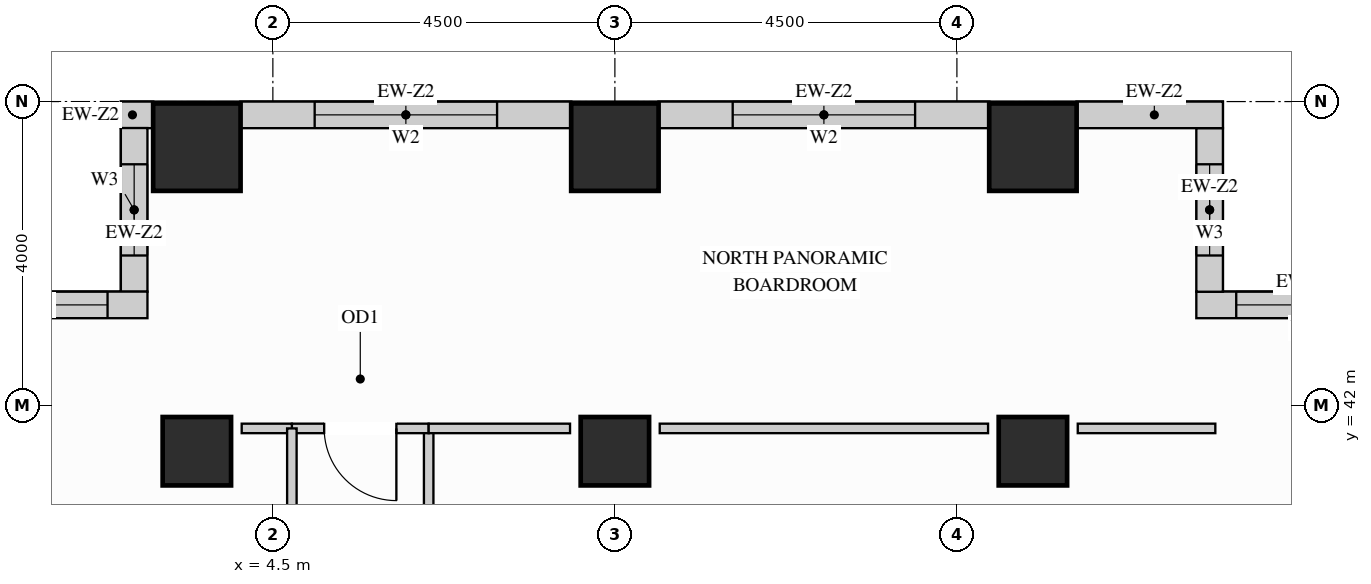
"""IFC4 building model, lengths in metres.
Left out: names, types, materials, properties, quantities, classifications, styles, units other than length and angle.
Written with IfcOpenShell. Run it as: python <this file> out.ifc"""

import sys

from ifc_helpers import new_model, si_unit, direction, frame, frame_2d, origin, origin_2d, place, context, subcontext, project, spatial, rectangle, extrude, source, transform, mapped, element, fill, save


model = new_model("IFC4")
c1 = context("Model", 3, precision=1e-05, world=origin(), true_north=direction((0.0, 1.0)))
c2 = subcontext(c1, "Body", "Model", "MODEL_VIEW")
j1 = project(units=[si_unit("LENGTHUNIT", "METRE"), si_unit("PLANEANGLEUNIT", "RADIAN")], contexts=[c1])
p1 = place(None, origin())
s1 = spatial("IfcSite", under=j1, at=p1, CompositionType="ELEMENT")
p2 = place(p1, origin())
s2 = spatial("IfcBuilding", under=s1, at=p2, CompositionType="ELEMENT")
p3 = place(p2, frame((0.0, 0.0, 95.4)))
s3 = spatial("IfcBuildingStorey", under=s2, at=p3, CompositionType="ELEMENT", Elevation=95.4)
m1 = source(origin(), c2, "Body", "SweptSolid", [
    extrude(rectangle(XDim=0.9, YDim=0.9, at=origin_2d()), origin(), (0.0, 0.0, 1.0), 3.38),
])
for number, where, z_axis, x_axis in (
    (1, (14.5, 41.4, 0.0), (0.0, 0.0, 1.0), (1.0, 0.0, 0.0)),
    (2, (3.5, 41.4, 0.0), (0.0, 0.0, 1.0), (1.0, 0.0, 0.0)),
    (3, (9.0, 41.4, 0.0), (0.0, 0.0, 1.0), (1.0, 0.0, 0.0)),
):
    element("IfcColumn", number, at=place(p3, frame(where, z_axis=z_axis, x_axis=x_axis)), inside=s3, PredefinedType="COLUMN", context=c2, shape_type="MappedRepresentation", body=[
        mapped(m1, transform((0.0, 0.0, 0.0), x_axis=(1.0, 0.0, 0.0), y_axis=(0.0, 1.0, 0.0), z_axis=(0.0, 0.0, 1.0))),
    ])
m2 = source(origin(), c2, "Body", "SweptSolid", [
    extrude(rectangle(XDim=1.15, YDim=1.15, at=origin_2d()), origin(), (0.0, 0.0, 1.0), 3.38),
])
for number, where, z_axis, x_axis in (
    (4, (14.5, 45.4, 0.0), (0.0, 0.0, 1.0), (1.0, 0.0, 0.0)),
    (5, (3.5, 45.4, 0.0), (0.0, 0.0, 1.0), (1.0, 0.0, 0.0)),
    (6, (9.0, 45.4, 0.0), (0.0, 0.0, 1.0), (1.0, 0.0, 0.0)),
):
    element("IfcColumn", number, at=place(p3, frame(where, z_axis=z_axis, x_axis=x_axis)), inside=s3, PredefinedType="COLUMN", context=c2, shape_type="MappedRepresentation", body=[
        mapped(m2, transform((0.0, 0.0, 0.0), x_axis=(1.0, 0.0, 0.0), y_axis=(0.0, 1.0, 0.0), z_axis=(0.0, 0.0, 1.0))),
    ])
p4 = place(p3, frame((19.5, 43.325, 0.0), z_axis=(0.0, 0.0, 1.0), x_axis=(-1.0, 0.0, 0.0)))
e7 = element("IfcWall", 7, at=p4, inside=s3, PredefinedType="SOLIDWALL", context=c2, shape_type="SweptSolid", body=[
    extrude(rectangle(XDim=2.85, YDim=0.35, at=frame_2d((1.425, 0.0))), origin(), (0.0, 0.0, 1.0), 3.365),
])
p5 = place(p4, frame((0.525, 0.0, 0.78)))
e8 = element("IfcOpeningElement", 8, at=p5, cuts=e7, PredefinedType="OPENING", context=c2, shape_type="SweptSolid", body=[
    extrude(rectangle(XDim=1.8, YDim=2.1, at=frame_2d((0.9, 1.05))), frame((0.0, 0.185, 0.0), z_axis=(0.0, -1.0, 0.0), x_axis=(1.0, 0.0, 0.0)), (0.0, 0.0, 1.0), 0.37),
])
p6 = place(p3, frame((16.825, 43.498, 0.0), z_axis=(0.0, 0.0, 1.0), x_axis=(0.0, 1.0, 0.0)))
e9 = element("IfcWall", 9, at=p6, inside=s3, PredefinedType="SOLIDWALL", context=c2, shape_type="SweptSolid", body=[
    extrude(rectangle(XDim=2.154, YDim=0.35, at=frame_2d((1.077, 0.0))), origin(), (0.0, 0.0, 1.0), 3.365),
])
p7 = place(p6, frame((0.477, 0.0, 0.78)))
e10 = element("IfcOpeningElement", 10, at=p7, cuts=e9, PredefinedType="OPENING", context=c2, shape_type="SweptSolid", body=[
    extrude(rectangle(XDim=1.2, YDim=2.1, at=frame_2d((0.6, 1.05))), frame((0.0, 0.185, 0.0), z_axis=(0.0, -1.0, 0.0), x_axis=(1.0, 0.0, 0.0)), (0.0, 0.0, 1.0), 0.37),
])
m3 = source(origin(), c2, "Body", "SweptSolid", [
    extrude(rectangle(XDim=1.927, YDim=0.35, at=frame_2d((0.963, 0.0))), origin(), (0.0, 0.0, 1.0), 3.365),
])
p8 = place(p3, frame((17.0, 45.825, 0.0), z_axis=(0.0, 0.0, 1.0), x_axis=(-1.0, 0.0, 0.0)))
e11 = element("IfcWall", 11, at=p8, inside=s3, PredefinedType="SOLIDWALL", context=c2, shape_type="MappedRepresentation", body=[
    mapped(m3, transform((0.0, 0.0, 0.0), x_axis=(1.0, 0.0, 0.0), y_axis=(0.0, 1.0, 0.0), z_axis=(0.0, 0.0, 1.0))),
])
p9 = place(p3, frame((13.927, 45.825, 0.0), z_axis=(0.0, 0.0, 1.0), x_axis=(-1.0, 0.0, 0.0)))
e12 = element("IfcWall", 12, at=p9, inside=s3, PredefinedType="SOLIDWALL", context=c2, shape_type="SweptSolid", body=[
    extrude(rectangle(XDim=4.354, YDim=0.35, at=frame_2d((2.177, 0.0))), origin(), (0.0, 0.0, 1.0), 3.365),
])
p10 = place(p9, frame((0.977, 0.0, 0.78)))
e13 = element("IfcOpeningElement", 13, at=p10, cuts=e12, PredefinedType="OPENING", context=c2, shape_type="SweptSolid", body=[
    extrude(rectangle(XDim=2.4, YDim=2.1, at=frame_2d((1.2, 1.05))), frame((0.0, 0.185, 0.0), z_axis=(0.0, -1.0, 0.0), x_axis=(1.0, 0.0, 0.0)), (0.0, 0.0, 1.0), 0.37),
])
p11 = place(p3, frame((8.427, 45.825, 0.0), z_axis=(0.0, 0.0, 1.0), x_axis=(-1.0, 0.0, 0.0)))
e14 = element("IfcWall", 14, at=p11, inside=s3, PredefinedType="SOLIDWALL", context=c2, shape_type="SweptSolid", body=[
    extrude(rectangle(XDim=4.354, YDim=0.35, at=frame_2d((2.177, 0.0))), origin(), (0.0, 0.0, 1.0), 3.365),
])
p12 = place(p11, frame((0.977, 0.0, 0.78)))
e15 = element("IfcOpeningElement", 15, at=p12, cuts=e14, PredefinedType="OPENING", context=c2, shape_type="SweptSolid", body=[
    extrude(rectangle(XDim=2.4, YDim=2.1, at=frame_2d((1.2, 1.05))), frame((0.0, 0.185, 0.0), z_axis=(0.0, -1.0, 0.0), x_axis=(1.0, 0.0, 0.0)), (0.0, 0.0, 1.0), 0.37),
])
m4 = source(origin(), c2, "Body", "SweptSolid", [
    extrude(rectangle(XDim=0.427, YDim=0.35, at=frame_2d((0.213, 0.0))), origin(), (0.0, 0.0, 1.0), 3.365),
])
p13 = place(p3, frame((2.927, 45.825, 0.0), z_axis=(0.0, 0.0, 1.0), x_axis=(-1.0, 0.0, 0.0)))
e16 = element("IfcWall", 16, at=p13, inside=s3, PredefinedType="SOLIDWALL", context=c2, shape_type="MappedRepresentation", body=[
    mapped(m4, transform((0.0, 0.0, 0.0), x_axis=(1.0, 0.0, 0.0), y_axis=(0.0, 1.0, 0.0), z_axis=(0.0, 0.0, 1.0))),
])
p14 = place(p3, frame((2.675, 45.652, 0.0), z_axis=(0.0, 0.0, 1.0), x_axis=(0.0, -1.0, 0.0)))
e17 = element("IfcWall", 17, at=p14, inside=s3, PredefinedType="SOLIDWALL", context=c2, shape_type="SweptSolid", body=[
    extrude(rectangle(XDim=2.154, YDim=0.35, at=frame_2d((1.077, 0.0))), origin(), (0.0, 0.0, 1.0), 3.365),
])
p15 = place(p14, frame((0.477, 0.0, 0.78)))
e18 = element("IfcOpeningElement", 18, at=p15, cuts=e17, PredefinedType="OPENING", context=c2, shape_type="SweptSolid", body=[
    extrude(rectangle(XDim=1.2, YDim=2.1, at=frame_2d((0.6, 1.05))), frame((0.0, 0.185, 0.0), z_axis=(0.0, -1.0, 0.0), x_axis=(1.0, 0.0, 0.0)), (0.0, 0.0, 1.0), 0.37),
])
p16 = place(p3, frame((2.85, 43.325, 0.0), z_axis=(0.0, 0.0, 1.0), x_axis=(-1.0, 0.0, 0.0)))
e19 = element("IfcWall", 19, at=p16, inside=s3, PredefinedType="SOLIDWALL", context=c2, shape_type="SweptSolid", body=[
    extrude(rectangle(XDim=2.85, YDim=0.35, at=frame_2d((1.425, 0.0))), origin(), (0.0, 0.0, 1.0), 3.365),
])
p17 = place(p16, frame((0.525, 0.0, 0.78)))
e20 = element("IfcOpeningElement", 20, at=p17, cuts=e19, PredefinedType="OPENING", context=c2, shape_type="SweptSolid", body=[
    extrude(rectangle(XDim=1.8, YDim=2.1, at=frame_2d((0.9, 1.05))), frame((0.0, 0.185, 0.0), z_axis=(0.0, -1.0, 0.0), x_axis=(1.0, 0.0, 0.0)), (0.0, 0.0, 1.0), 0.37),
])
p18 = place(p3, frame((6.55, 37.077, 0.0), z_axis=(0.0, 0.0, 1.0), x_axis=(0.0, 1.0, 0.0)))
e21 = element("IfcWall", 21, at=p18, inside=s3, PredefinedType="PARTITIONING", context=c2, shape_type="SweptSolid", body=[
    extrude(rectangle(XDim=4.623, YDim=0.125, at=frame_2d((2.312, 0.0))), origin(), (0.0, 0.0, 1.0), 3.365),
])
p19 = place(p18, frame((1.836, 0.0, 0.0)))
e22 = element("IfcOpeningElement", 22, at=p19, cuts=e21, PredefinedType="OPENING", context=c2, shape_type="SweptSolid", body=[
    extrude(rectangle(XDim=0.95, YDim=2.15, at=frame_2d((0.475, 1.075))), frame((0.0, 0.073, 0.0), z_axis=(0.0, -1.0, 0.0), x_axis=(1.0, 0.0, 0.0)), (0.0, 0.0, 1.0), 0.145),
])
p20 = place(p3, frame((4.75, 41.7, 0.0), z_axis=(0.0, 0.0, 1.0), x_axis=(1.0, 0.0, 0.0)))
e23 = element("IfcWall", 23, at=p20, inside=s3, PredefinedType="PARTITIONING", context=c2, shape_type="SweptSolid", body=[
    extrude(rectangle(XDim=1.8, YDim=0.125, at=frame_2d((0.9, 0.0))), origin(), (0.0, 0.0, 1.0), 3.365),
])
p21 = place(p20, frame((0.425, 0.0, 0.0)))
e24 = element("IfcOpeningElement", 24, at=p21, cuts=e23, PredefinedType="OPENING", context=c2, shape_type="SweptSolid", body=[
    extrude(rectangle(XDim=0.95, YDim=2.15, at=frame_2d((0.475, 1.075))), frame((0.0, 0.073, 0.0), z_axis=(0.0, -1.0, 0.0), x_axis=(1.0, 0.0, 0.0)), (0.0, 0.0, 1.0), 0.145),
])
m5 = source(origin(), c2, "Body", "SweptSolid", [
    extrude(rectangle(XDim=1.86, YDim=0.125, at=frame_2d((0.93, 0.0))), origin(), (0.0, 0.0, 1.0), 3.365),
])
p22 = place(p3, frame((6.55, 41.7, 0.0), z_axis=(0.0, 0.0, 1.0), x_axis=(1.0, 0.0, 0.0)))
e25 = element("IfcWall", 25, at=p22, inside=s3, PredefinedType="PARTITIONING", context=c2, shape_type="MappedRepresentation", body=[
    mapped(m5, transform((0.0, 0.0, 0.0), x_axis=(1.0, 0.0, 0.0), y_axis=(0.0, 1.0, 0.0), z_axis=(0.0, 0.0, 1.0))),
])
m6 = source(origin(), c2, "Body", "SweptSolid", [
    extrude(rectangle(XDim=4.32, YDim=0.125, at=frame_2d((2.16, 0.0))), origin(), (0.0, 0.0, 1.0), 3.365),
])
p23 = place(p3, frame((9.59, 41.7, 0.0), z_axis=(0.0, 0.0, 1.0), x_axis=(1.0, 0.0, 0.0)))
e26 = element("IfcWall", 26, at=p23, inside=s3, PredefinedType="PARTITIONING", context=c2, shape_type="MappedRepresentation", body=[
    mapped(m6, transform((0.0, 0.0, 0.0), x_axis=(1.0, 0.0, 0.0), y_axis=(0.0, 1.0, 0.0), z_axis=(0.0, 0.0, 1.0))),
])
m7 = source(origin(), c2, "Body", "SweptSolid", [
    extrude(rectangle(XDim=1.81, YDim=0.125, at=frame_2d((0.905, 0.0))), origin(), (0.0, 0.0, 1.0), 3.365),
])
p24 = place(p3, frame((15.09, 41.7, 0.0), z_axis=(0.0, 0.0, 1.0), x_axis=(1.0, 0.0, 0.0)))
e27 = element("IfcWall", 27, at=p24, inside=s3, PredefinedType="PARTITIONING", context=c2, shape_type="MappedRepresentation", body=[
    mapped(m7, transform((0.0, 0.0, 0.0), x_axis=(1.0, 0.0, 0.0), y_axis=(0.0, 1.0, 0.0), z_axis=(0.0, 0.0, 1.0))),
])
m8 = source(origin(), c2, "Body", "SweptSolid", [
    extrude(rectangle(XDim=0.66, YDim=0.125, at=frame_2d((0.33, 0.0))), origin(), (0.0, 0.0, 1.0), 3.365),
])
p25 = place(p3, frame((4.09, 41.7, 0.0), z_axis=(0.0, 0.0, 1.0), x_axis=(1.0, 0.0, 0.0)))
e28 = element("IfcWall", 28, at=p25, inside=s3, PredefinedType="PARTITIONING", context=c2, shape_type="MappedRepresentation", body=[
    mapped(m8, transform((0.0, 0.0, 0.0), x_axis=(1.0, 0.0, 0.0), y_axis=(0.0, 1.0, 0.0), z_axis=(0.0, 0.0, 1.0))),
])
p26 = place(p3, frame((4.75, 31.65, 0.0), z_axis=(0.0, 0.0, 1.0), x_axis=(0.0, 1.0, 0.0)))
e29 = element("IfcWall", 29, at=p26, inside=s3, PredefinedType="PARTITIONING", context=c2, shape_type="SweptSolid", body=[
    extrude(rectangle(XDim=10.05, YDim=0.125, at=frame_2d((5.025, 0.0))), origin(), (0.0, 0.0, 1.0), 3.365),
])
p27 = place(p26, frame((4.245, 0.0, 0.0)))
e30 = element("IfcOpeningElement", 30, at=p27, cuts=e29, PredefinedType="OPENING", context=c2, shape_type="SweptSolid", body=[
    extrude(rectangle(XDim=0.95, YDim=2.15, at=frame_2d((0.475, 1.075))), frame((0.0, 0.073, 0.0), z_axis=(0.0, -1.0, 0.0), x_axis=(1.0, 0.0, 0.0)), (0.0, 0.0, 1.0), 0.145),
])
m9 = source(origin(), c2, "Body", "SweptSolid", [
    extrude(rectangle(XDim=0.95, YDim=2.15, at=frame_2d((0.475, 1.075))), frame((0.0, 0.025, 0.0), z_axis=(0.0, -1.0, 0.0), x_axis=(1.0, 0.0, 0.0)), (0.0, 0.0, 1.0), 0.05),
])
p28 = place(p21, origin())
e31 = element("IfcDoor", 31, at=p28, inside=s3, OperationType="SINGLE_SWING_RIGHT", PredefinedType="DOOR", context=c2, shape_type="MappedRepresentation", body=[
    mapped(m9, transform((0.0, 0.0, 0.0), x_axis=(1.0, 0.0, 0.0), y_axis=(0.0, 1.0, 0.0), z_axis=(0.0, 0.0, 1.0))),
])
fill(e24, e31)
m10 = source(origin(), c2, "Body", "SweptSolid", [
    extrude(rectangle(XDim=1.8, YDim=2.1, at=frame_2d((0.9, 1.05))), frame((0.0, 0.03, 0.0), z_axis=(0.0, -1.0, 0.0), x_axis=(1.0, 0.0, 0.0)), (0.0, 0.0, 1.0), 0.06),
])
p29 = place(p5, origin())
e32 = element("IfcWindow", 32, at=p29, inside=s3, PartitioningType="SINGLE_PANEL", PredefinedType="WINDOW", context=c2, shape_type="MappedRepresentation", body=[
    mapped(m10, transform((0.0, 0.0, 0.0), x_axis=(1.0, 0.0, 0.0), y_axis=(0.0, 1.0, 0.0), z_axis=(0.0, 0.0, 1.0))),
])
fill(e8, e32)
p30 = place(p17, origin())
e33 = element("IfcWindow", 33, at=p30, inside=s3, PartitioningType="SINGLE_PANEL", PredefinedType="WINDOW", context=c2, shape_type="MappedRepresentation", body=[
    mapped(m10, transform((0.0, 0.0, 0.0), x_axis=(1.0, 0.0, 0.0), y_axis=(0.0, 1.0, 0.0), z_axis=(0.0, 0.0, 1.0))),
])
fill(e20, e33)
m11 = source(origin(), c2, "Body", "SweptSolid", [
    extrude(rectangle(XDim=2.4, YDim=2.1, at=frame_2d((1.2, 1.05))), frame((0.0, 0.03, 0.0), z_axis=(0.0, -1.0, 0.0), x_axis=(1.0, 0.0, 0.0)), (0.0, 0.0, 1.0), 0.06),
])
p31 = place(p10, origin())
e34 = element("IfcWindow", 34, at=p31, inside=s3, PartitioningType="SINGLE_PANEL", PredefinedType="WINDOW", context=c2, shape_type="MappedRepresentation", body=[
    mapped(m11, transform((0.0, 0.0, 0.0), x_axis=(1.0, 0.0, 0.0), y_axis=(0.0, 1.0, 0.0), z_axis=(0.0, 0.0, 1.0))),
])
fill(e13, e34)
p32 = place(p12, origin())
e35 = element("IfcWindow", 35, at=p32, inside=s3, PartitioningType="SINGLE_PANEL", PredefinedType="WINDOW", context=c2, shape_type="MappedRepresentation", body=[
    mapped(m11, transform((0.0, 0.0, 0.0), x_axis=(1.0, 0.0, 0.0), y_axis=(0.0, 1.0, 0.0), z_axis=(0.0, 0.0, 1.0))),
])
fill(e15, e35)
m12 = source(origin(), c2, "Body", "SweptSolid", [
    extrude(rectangle(XDim=1.2, YDim=2.1, at=frame_2d((0.6, 1.05))), frame((0.0, 0.03, 0.0), z_axis=(0.0, -1.0, 0.0), x_axis=(1.0, 0.0, 0.0)), (0.0, 0.0, 1.0), 0.06),
])
p33 = place(p7, origin())
e36 = element("IfcWindow", 36, at=p33, inside=s3, PartitioningType="SINGLE_PANEL", PredefinedType="WINDOW", context=c2, shape_type="MappedRepresentation", body=[
    mapped(m12, transform((0.0, 0.0, 0.0), x_axis=(1.0, 0.0, 0.0), y_axis=(0.0, 1.0, 0.0), z_axis=(0.0, 0.0, 1.0))),
])
fill(e10, e36)
p34 = place(p15, origin())
e37 = element("IfcWindow", 37, at=p34, inside=s3, PartitioningType="SINGLE_PANEL", PredefinedType="WINDOW", context=c2, shape_type="MappedRepresentation", body=[
    mapped(m12, transform((0.0, 0.0, 0.0), x_axis=(1.0, 0.0, 0.0), y_axis=(0.0, 1.0, 0.0), z_axis=(0.0, 0.0, 1.0))),
])
fill(e18, e37)
save(model, sys.argv[1])
